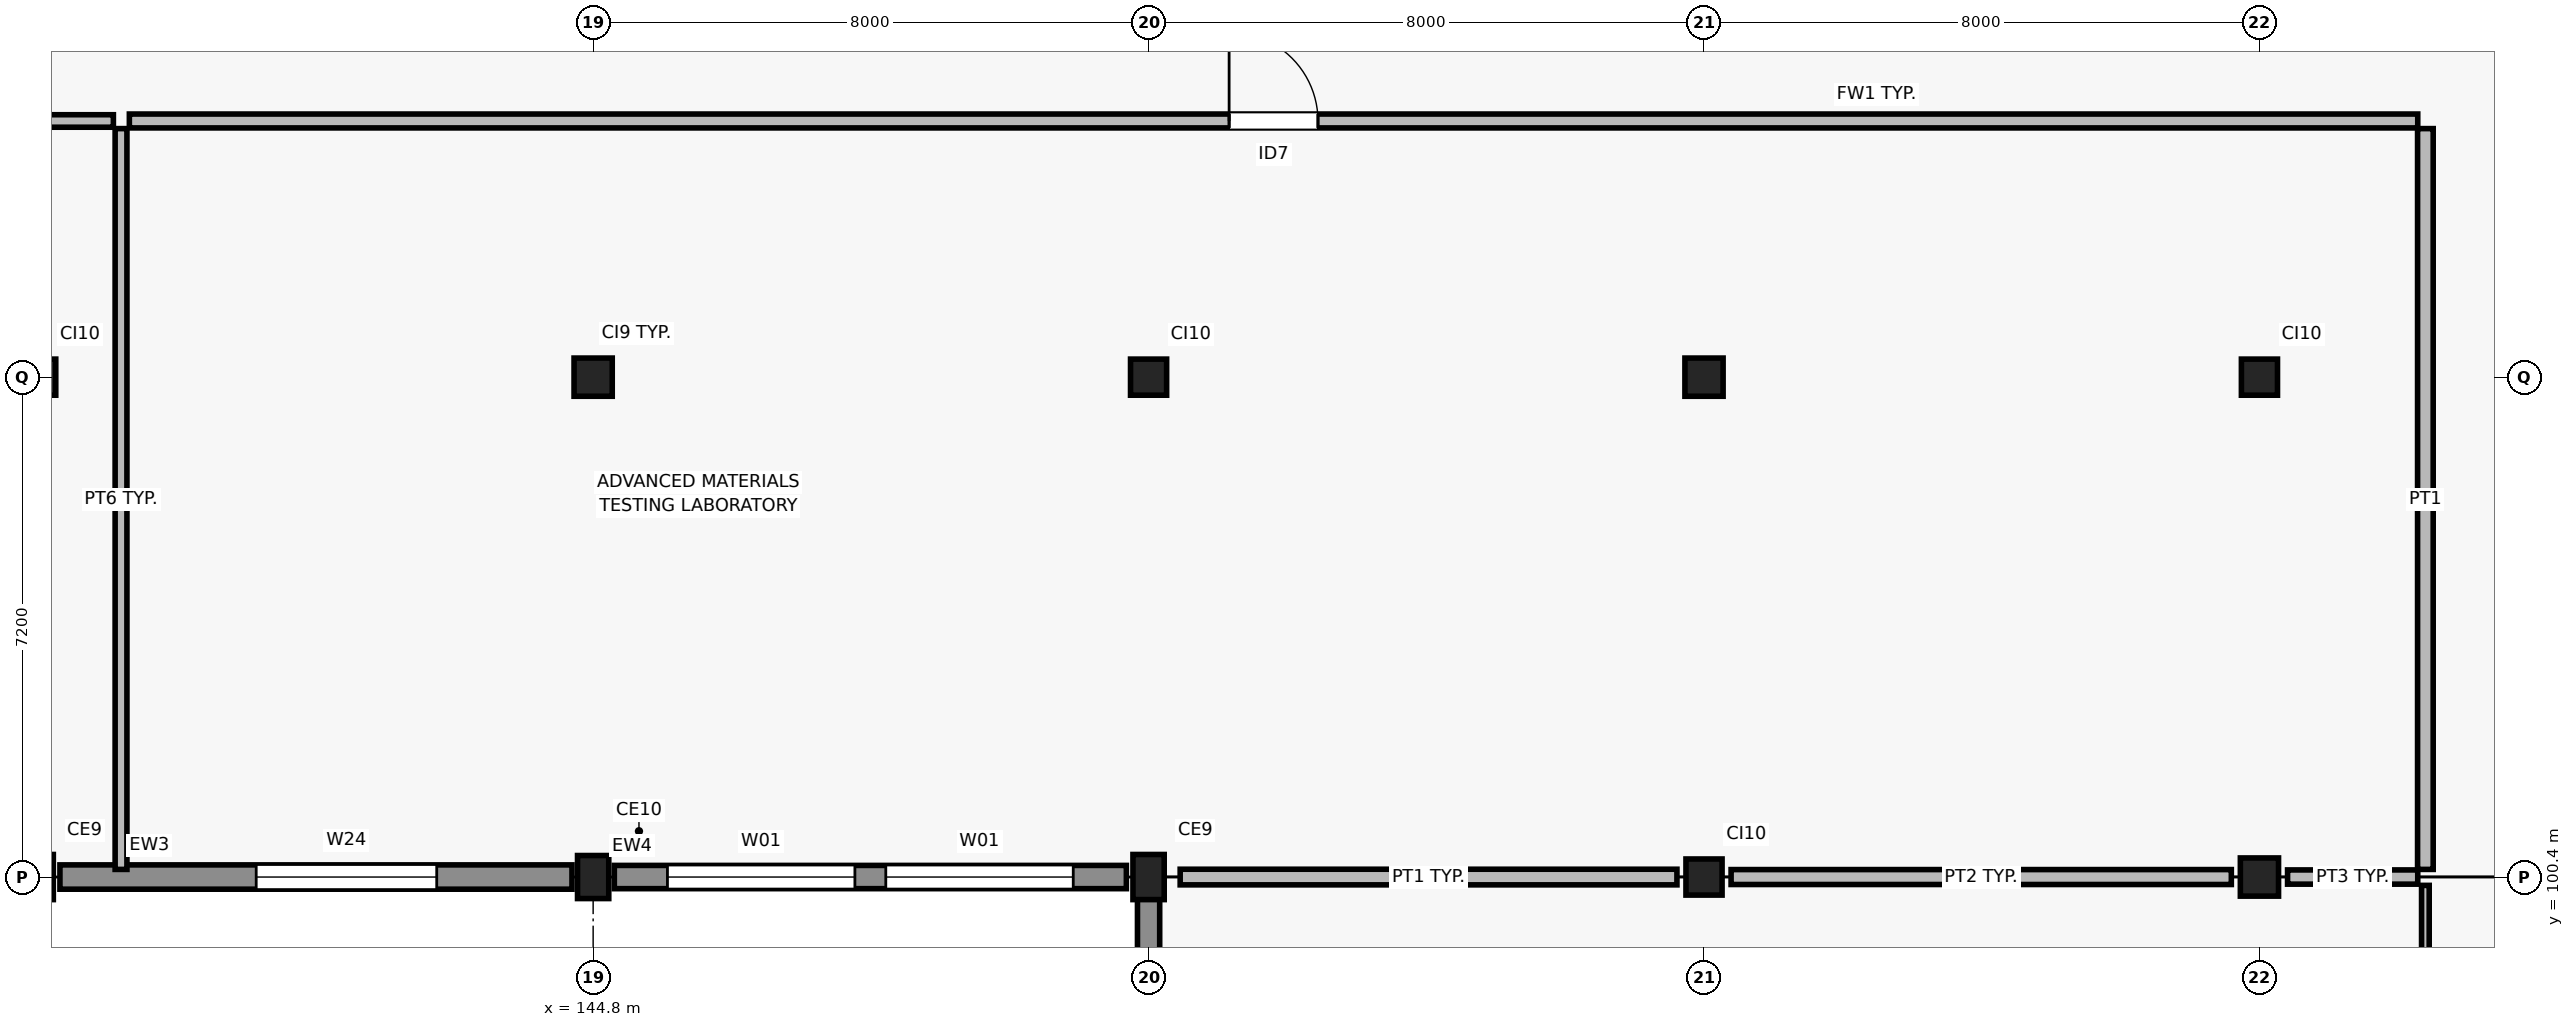
"""IFC4 building model, lengths in metres.
Left out: names, types, materials, properties, quantities, classifications, styles, units other than length and angle.
Written with IfcOpenShell. Run it as: python <this file> out.ifc"""

import sys

from ifc_helpers import new_model, si_unit, direction, frame, frame_2d, origin, origin_2d, place, context, subcontext, project, spatial, rectangle, extrude, element, fill, save


model = new_model("IFC4")
c1 = context("Model", 3, precision=1e-05, world=origin(), true_north=direction((0.0, 1.0)))
c2 = subcontext(c1, "Body", "Model", "MODEL_VIEW")
j1 = project(units=[si_unit("LENGTHUNIT", "METRE"), si_unit("PLANEANGLEUNIT", "RADIAN")], contexts=[c1])
p1 = place(None, origin())
s1 = spatial("IfcSite", under=j1, at=p1, CompositionType="ELEMENT")
p2 = place(p1, origin())
s2 = spatial("IfcBuilding", under=s1, at=p2, CompositionType="ELEMENT")
p3 = place(p2, frame((0.0, 0.0, 21.6)))
s3 = spatial("IfcBuildingStorey", under=s2, at=p3, CompositionType="ELEMENT", Elevation=21.6)
p4 = place(p3, frame((136.8, 100.4, 0.0), z_axis=(0.0, 0.0, 1.0), x_axis=(1.0, 0.0, 0.0)))
e1 = element("IfcColumn", 1, at=p4, inside=s3, PredefinedType="COLUMN", context=c2, shape_type="SweptSolid", body=[
    extrude(rectangle(XDim=0.65, YDim=0.45, at=origin_2d()), origin(), (0.0, 0.0, 1.0), 4.2),
])
p5 = place(p3, frame((136.8, 107.6, 0.0), z_axis=(0.0, 0.0, 1.0), x_axis=(1.0, 0.0, 0.0)))
e2 = element("IfcColumn", 2, at=p5, inside=s3, PredefinedType="COLUMN", context=c2, shape_type="SweptSolid", body=[
    extrude(rectangle(XDim=0.52, YDim=0.52, at=origin_2d()), origin(), (0.0, 0.0, 1.0), 4.2),
])
p6 = place(p3, frame((144.8, 100.4, 0.0), z_axis=(0.0, 0.0, 1.0), x_axis=(1.0, 0.0, 0.0)))
e3 = element("IfcColumn", 3, at=p6, inside=s3, PredefinedType="COLUMN", context=c2, shape_type="SweptSolid", body=[
    extrude(rectangle(XDim=0.62, YDim=0.45, at=origin_2d()), origin(), (0.0, 0.0, 1.0), 4.2),
])
p7 = place(p3, frame((144.8, 107.6, 0.0), z_axis=(0.0, 0.0, 1.0), x_axis=(1.0, 0.0, 0.0)))
e4 = element("IfcColumn", 4, at=p7, inside=s3, PredefinedType="COLUMN", context=c2, shape_type="SweptSolid", body=[
    extrude(rectangle(XDim=0.55, YDim=0.55, at=origin_2d()), origin(), (0.0, 0.0, 1.0), 4.2),
])
p8 = place(p3, frame((152.8, 100.4, 0.0), z_axis=(0.0, 0.0, 1.0), x_axis=(1.0, 0.0, 0.0)))
e5 = element("IfcColumn", 5, at=p8, inside=s3, PredefinedType="COLUMN", context=c2, shape_type="SweptSolid", body=[
    extrude(rectangle(XDim=0.65, YDim=0.45, at=origin_2d()), origin(), (0.0, 0.0, 1.0), 4.2),
])
for number, where, z_axis, x_axis in (
    (6, (152.8, 107.6, 0.0), (0.0, 0.0, 1.0), (1.0, 0.0, 0.0)),
    (7, (160.8, 100.4, 0.0), (0.0, 0.0, 1.0), (1.0, 0.0, 0.0)),
):
    element("IfcColumn", number, at=place(p3, frame(where, z_axis=z_axis, x_axis=x_axis)), inside=s3, PredefinedType="COLUMN", context=c2, shape_type="SweptSolid", body=[
        extrude(rectangle(XDim=0.52, YDim=0.52, at=origin_2d()), origin(), (0.0, 0.0, 1.0), 4.2),
    ])
for number, where, z_axis, x_axis in (
    (8, (160.8, 107.6, 0.0), (0.0, 0.0, 1.0), (1.0, 0.0, 0.0)),
    (9, (168.8, 100.4, 0.0), (0.0, 0.0, 1.0), (1.0, 0.0, 0.0)),
):
    element("IfcColumn", number, at=place(p3, frame(where, z_axis=z_axis, x_axis=x_axis)), inside=s3, PredefinedType="COLUMN", context=c2, shape_type="SweptSolid", body=[
        extrude(rectangle(XDim=0.55, YDim=0.55, at=origin_2d()), origin(), (0.0, 0.0, 1.0), 4.2),
    ])
p9 = place(p3, frame((168.8, 107.6, 0.0), z_axis=(0.0, 0.0, 1.0), x_axis=(1.0, 0.0, 0.0)))
e10 = element("IfcColumn", 10, at=p9, inside=s3, PredefinedType="COLUMN", context=c2, shape_type="SweptSolid", body=[
    extrude(rectangle(XDim=0.52, YDim=0.52, at=origin_2d()), origin(), (0.0, 0.0, 1.0), 4.2),
])
p10 = place(p3, frame((137.12, 100.4, 0.0), z_axis=(0.0, 0.0, 1.0), x_axis=(1.0, 0.0, 0.0)))
e11 = element("IfcWall", 11, at=p10, inside=s3, PredefinedType="SOLIDWALL", context=c2, shape_type="SweptSolid", body=[
    extrude(rectangle(XDim=7.375, YDim=0.35, at=frame_2d((3.688, 0.0))), origin(), (0.0, 0.0, 1.0), 3.3),
])
p11 = place(p10, frame((2.827, 0.0, 0.9)))
e12 = element("IfcOpeningElement", 12, at=p11, cuts=e11, PredefinedType="OPENING", context=c2, shape_type="SweptSolid", body=[
    extrude(rectangle(XDim=2.6, YDim=1.65, at=frame_2d((1.3, 0.825))), frame((0.0, 0.185, 0.0), z_axis=(0.0, -1.0, 0.0), x_axis=(1.0, 0.0, 0.0)), (0.0, 0.0, 1.0), 0.37),
])
p12 = place(p3, frame((145.105, 100.4, 0.0), z_axis=(0.0, 0.0, 1.0), x_axis=(1.0, 0.0, 0.0)))
e13 = element("IfcWall", 13, at=p12, inside=s3, PredefinedType="SOLIDWALL", context=c2, shape_type="SweptSolid", body=[
    extrude(rectangle(XDim=7.375, YDim=0.335, at=frame_2d((3.688, 0.0))), origin(), (0.0, 0.0, 1.0), 3.43),
])
p13 = place(p12, frame((0.765, 0.0, 0.9)))
e14 = element("IfcOpeningElement", 14, at=p13, cuts=e13, PredefinedType="OPENING", context=c2, shape_type="SweptSolid", body=[
    extrude(rectangle(XDim=2.7, YDim=1.8, at=frame_2d((1.35, 0.9))), frame((0.0, 0.177, 0.0), z_axis=(0.0, -1.0, 0.0), x_axis=(1.0, 0.0, 0.0)), (0.0, 0.0, 1.0), 0.355),
])
p14 = place(p12, frame((3.91, 0.0, 0.9)))
e15 = element("IfcOpeningElement", 15, at=p14, cuts=e13, PredefinedType="OPENING", context=c2, shape_type="SweptSolid", body=[
    extrude(rectangle(XDim=2.7, YDim=1.8, at=frame_2d((1.35, 0.9))), frame((0.0, 0.177, 0.0), z_axis=(0.0, -1.0, 0.0), x_axis=(1.0, 0.0, 0.0)), (0.0, 0.0, 1.0), 0.355),
])
p15 = place(p3, frame((152.8, 100.18, 0.0), z_axis=(0.0, 0.0, 1.0), x_axis=(0.0, -1.0, 0.0)))
e16 = element("IfcWall", 16, at=p15, inside=s3, PredefinedType="SOLIDWALL", context=c2, shape_type="SweptSolid", body=[
    extrude(rectangle(XDim=6.76, YDim=0.32, at=frame_2d((3.38, 0.0))), origin(), (0.0, 0.0, 1.0), 3.4),
])
p16 = place(p15, frame((0.893, 0.0, 0.9)))
e17 = element("IfcOpeningElement", 17, at=p16, cuts=e16, PredefinedType="OPENING", context=c2, shape_type="SweptSolid", body=[
    extrude(rectangle(XDim=2.2, YDim=1.8, at=frame_2d((1.1, 0.9))), frame((0.0, 0.17, 0.0), z_axis=(0.0, -1.0, 0.0), x_axis=(1.0, 0.0, 0.0)), (0.0, 0.0, 1.0), 0.34),
])
p17 = place(p15, frame((3.667, 0.0, 0.9)))
e18 = element("IfcOpeningElement", 18, at=p17, cuts=e16, PredefinedType="OPENING", context=c2, shape_type="SweptSolid", body=[
    extrude(rectangle(XDim=2.2, YDim=1.8, at=frame_2d((1.1, 0.9))), frame((0.0, 0.17, 0.0), z_axis=(0.0, -1.0, 0.0), x_axis=(1.0, 0.0, 0.0)), (0.0, 0.0, 1.0), 0.34),
])
p18 = place(p3, frame((120.8, 111.29, 0.0), z_axis=(0.0, 0.0, 1.0), x_axis=(1.0, 0.0, 0.0)))
e19 = element("IfcWall", 19, at=p18, inside=s3, PredefinedType="PARTITIONING", context=c2, shape_type="SweptSolid", body=[
    extrude(rectangle(XDim=17.09, YDim=0.18, at=frame_2d((8.545, 0.0))), origin(), (0.0, 0.0, 1.0), 3.9),
])
p19 = place(p3, frame((138.0, 100.51, 0.0), z_axis=(0.0, 0.0, 1.0), x_axis=(0.0, 1.0, 0.0)))
e20 = element("IfcWall", 20, at=p19, inside=s3, PredefinedType="PARTITIONING", context=c2, shape_type="SweptSolid", body=[
    extrude(rectangle(XDim=10.67, YDim=0.17, at=frame_2d((5.335, 0.0))), origin(), (0.0, 0.0, 1.0), 3.9),
])
p20 = place(p3, frame((153.255, 100.4, 0.0), z_axis=(0.0, 0.0, 1.0), x_axis=(1.0, 0.0, 0.0)))
e21 = element("IfcWall", 21, at=p20, inside=s3, PredefinedType="PARTITIONING", context=c2, shape_type="SweptSolid", body=[
    extrude(rectangle(XDim=7.155, YDim=0.225, at=frame_2d((3.578, 0.0))), origin(), (0.0, 0.0, 1.0), 3.26),
])
p21 = place(p3, frame((161.19, 100.4, 0.0), z_axis=(0.0, 0.0, 1.0), x_axis=(1.0, 0.0, 0.0)))
e22 = element("IfcWall", 22, at=p21, inside=s3, PredefinedType="PARTITIONING", context=c2, shape_type="SweptSolid", body=[
    extrude(rectangle(XDim=7.205, YDim=0.215, at=frame_2d((3.603, 0.0))), origin(), (0.0, 0.0, 1.0), 3.32),
])
p22 = place(p3, frame((169.205, 100.4, 0.0), z_axis=(0.0, 0.0, 1.0), x_axis=(1.0, 0.0, 0.0)))
e23 = element("IfcWall", 23, at=p22, inside=s3, PredefinedType="PARTITIONING", context=c2, shape_type="SweptSolid", body=[
    extrude(rectangle(XDim=1.875, YDim=0.205, at=frame_2d((0.938, 0.0))), origin(), (0.0, 0.0, 1.0), 3.33),
])
p23 = place(p3, frame((138.12, 111.29, 0.0), z_axis=(0.0, 0.0, 1.0), x_axis=(1.0, 0.0, 0.0)))
e24 = element("IfcWall", 24, at=p23, inside=s3, PredefinedType="SOLIDWALL", context=c2, shape_type="SweptSolid", body=[
    extrude(rectangle(XDim=32.96, YDim=0.2, at=frame_2d((16.48, 0.0))), origin(), (0.0, 0.0, 1.0), 3.9),
])
p24 = place(p23, frame((15.84, 0.0, 0.0)))
e25 = element("IfcOpeningElement", 25, at=p24, cuts=e24, PredefinedType="OPENING", context=c2, shape_type="SweptSolid", body=[
    extrude(rectangle(XDim=1.28, YDim=2.2, at=frame_2d((0.64, 1.1))), frame((0.0, 0.11, 0.0), z_axis=(0.0, -1.0, 0.0), x_axis=(1.0, 0.0, 0.0)), (0.0, 0.0, 1.0), 0.22),
])
p25 = place(p3, frame((171.19, 100.51, 0.0), z_axis=(0.0, 0.0, 1.0), x_axis=(0.0, 1.0, 0.0)))
e26 = element("IfcWall", 26, at=p25, inside=s3, PredefinedType="PARTITIONING", context=c2, shape_type="SweptSolid", body=[
    extrude(rectangle(XDim=10.67, YDim=0.225, at=frame_2d((5.335, 0.0))), origin(), (0.0, 0.0, 1.0), 3.9),
])
p26 = place(p3, frame((171.19, 85.71, 0.0), z_axis=(0.0, 0.0, 1.0), x_axis=(0.0, 1.0, 0.0)))
e27 = element("IfcWall", 27, at=p26, inside=s3, PredefinedType="PARTITIONING", context=c2, shape_type="SweptSolid", body=[
    extrude(rectangle(XDim=14.57, YDim=0.11, at=frame_2d((7.285, 0.0))), origin(), (0.0, 0.0, 1.0), 3.9),
])
p27 = place(p26, frame((6.765, 0.0, 0.0)))
e28 = element("IfcOpeningElement", 28, at=p27, cuts=e27, PredefinedType="OPENING", context=c2, shape_type="SweptSolid", body=[
    extrude(rectangle(XDim=1.04, YDim=2.15, at=frame_2d((0.52, 1.075))), frame((0.0, 0.065, 0.0), z_axis=(0.0, -1.0, 0.0), x_axis=(1.0, 0.0, 0.0)), (0.0, 0.0, 1.0), 0.13),
])
p28 = place(p11, origin())
e29 = element("IfcWindow", 29, at=p28, inside=s3, PartitioningType="SINGLE_PANEL", PredefinedType="WINDOW", context=c2, shape_type="SweptSolid", body=[
    extrude(rectangle(XDim=2.6, YDim=1.65, at=frame_2d((1.3, 0.825))), frame((0.0, 0.03, 0.0), z_axis=(0.0, -1.0, 0.0), x_axis=(1.0, 0.0, 0.0)), (0.0, 0.0, 1.0), 0.06),
])
fill(e12, e29)
p29 = place(p13, origin())
e30 = element("IfcWindow", 30, at=p29, inside=s3, PartitioningType="SINGLE_PANEL", PredefinedType="WINDOW", context=c2, shape_type="SweptSolid", body=[
    extrude(rectangle(XDim=2.7, YDim=1.8, at=frame_2d((1.35, 0.9))), frame((0.0, 0.03, 0.0), z_axis=(0.0, -1.0, 0.0), x_axis=(1.0, 0.0, 0.0)), (0.0, 0.0, 1.0), 0.06),
])
fill(e14, e30)
p30 = place(p14, origin())
e31 = element("IfcWindow", 31, at=p30, inside=s3, PartitioningType="SINGLE_PANEL", PredefinedType="WINDOW", context=c2, shape_type="SweptSolid", body=[
    extrude(rectangle(XDim=2.7, YDim=1.8, at=frame_2d((1.35, 0.9))), frame((0.0, 0.03, 0.0), z_axis=(0.0, -1.0, 0.0), x_axis=(1.0, 0.0, 0.0)), (0.0, 0.0, 1.0), 0.06),
])
fill(e15, e31)
p31 = place(p24, origin())
e32 = element("IfcDoor", 32, at=p31, inside=s3, OperationType="SINGLE_SWING_LEFT", PredefinedType="DOOR", context=c2, shape_type="SweptSolid", body=[
    extrude(rectangle(XDim=1.28, YDim=2.2, at=frame_2d((0.64, 1.1))), frame((0.0, 0.025, 0.0), z_axis=(0.0, -1.0, 0.0), x_axis=(1.0, 0.0, 0.0)), (0.0, 0.0, 1.0), 0.05),
])
fill(e25, e32)
save(model, sys.argv[1])
